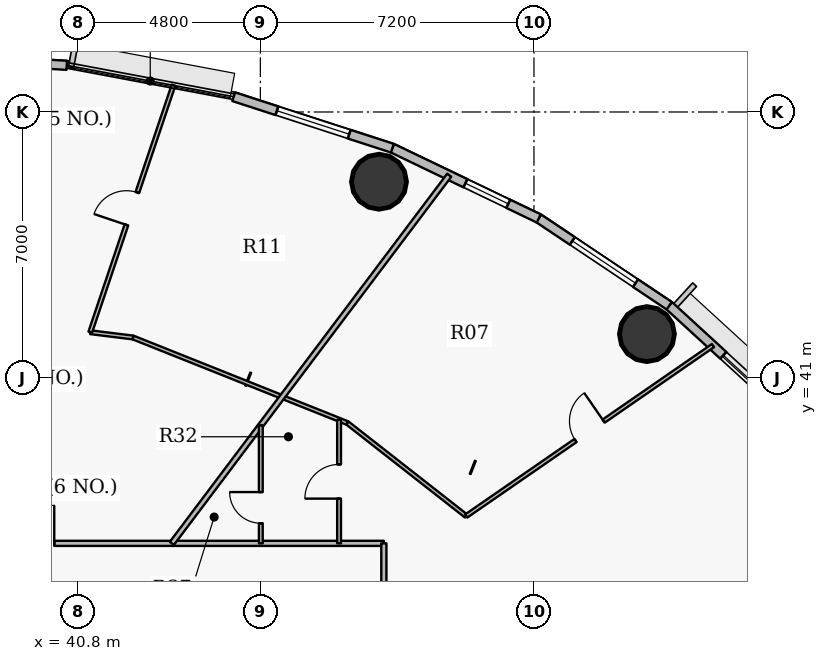
"""IFC4 building model, lengths in metres.
Left out: names, types, materials, properties, quantities, classifications, styles, units other than length and angle.
Written with IfcOpenShell. Run it as: python <this file> out.ifc"""

import sys

from ifc_helpers import new_model, si_unit, direction, frame, frame_2d, origin, origin_2d, place, context, subcontext, project, spatial, rectangle, hollow_circle, extrude, source, transform, mapped, element, fill, save


model = new_model("IFC4")
c1 = context("Model", 3, precision=1e-05, world=origin(), true_north=direction((0.0, 1.0)))
c2 = subcontext(c1, "Body", "Model", "MODEL_VIEW")
j1 = project(units=[si_unit("LENGTHUNIT", "METRE"), si_unit("PLANEANGLEUNIT", "RADIAN")], contexts=[c1])
p1 = place(None, origin())
s1 = spatial("IfcSite", under=j1, at=p1, CompositionType="ELEMENT")
p2 = place(p1, origin())
s2 = spatial("IfcBuilding", under=s1, at=p2, CompositionType="ELEMENT")
p3 = place(p2, frame((0.0, 0.0, 112.2)))
s3 = spatial("IfcBuildingStorey", under=s2, at=p3, CompositionType="ELEMENT", Elevation=112.2)
for number, where, z_axis, x_axis in (
    (1, (55.773, 42.156, 0.0), (0.0, 0.0, 1.0), (1.0, 0.0, 0.0)),
    (2, (48.722, 46.165, 0.0), (0.0, 0.0, 1.0), (1.0, 0.0, 0.0)),
):
    element("IfcColumn", number, at=place(p3, frame(where, z_axis=z_axis, x_axis=x_axis)), inside=s3, PredefinedType="COLUMN", context=c2, shape_type="SweptSolid", body=[
        extrude(hollow_circle(Radius=0.725, WallThickness=0.042, at=origin_2d()), origin(), (0.0, 0.0, 1.0), 3.75),
    ])
p4 = place(p3, frame((56.358, 42.903, 0.0), z_axis=(0.0, 0.0, 1.0), x_axis=(0.737113356241, -0.675769117414, 0.0)))
e3 = element("IfcWall", 3, at=p4, inside=s3, PredefinedType="SOLIDWALL", context=c2, shape_type="SweptSolid", body=[
    extrude(rectangle(XDim=3.976, YDim=0.24, at=frame_2d((1.988, 0.0))), origin(), (0.0, 0.0, 1.0), 3.5),
])
p5 = place(p4, frame((1.933, 0.0, 0.9)))
e4 = element("IfcOpeningElement", 4, at=p5, cuts=e3, PredefinedType="OPENING", context=c2, shape_type="SweptSolid", body=[
    extrude(rectangle(XDim=1.25, YDim=1.65, at=origin_2d()), frame((0.625, 0.13, 0.825), z_axis=(0.0, -1.0, 0.0), x_axis=(1.0, 0.0, 0.0)), (0.0, 0.0, 1.0), 0.26),
])
p6 = place(p3, frame((52.925, 45.199, 0.0), z_axis=(0.0, 0.0, 1.0), x_axis=(0.831221811447, -0.555940914284, 0.0)))
e5 = element("IfcWall", 5, at=p6, inside=s3, PredefinedType="SOLIDWALL", context=c2, shape_type="SweptSolid", body=[
    extrude(rectangle(XDim=4.13, YDim=0.24, at=frame_2d((2.065, 0.0))), origin(), (0.0, 0.0, 1.0), 3.5),
])
p7 = place(p6, frame((1.065, 0.0, 0.9)))
e6 = element("IfcOpeningElement", 6, at=p7, cuts=e5, PredefinedType="OPENING", context=c2, shape_type="SweptSolid", body=[
    extrude(rectangle(XDim=2.0, YDim=1.75, at=origin_2d()), frame((1.0, 0.13, 0.875), z_axis=(0.0, -1.0, 0.0), x_axis=(1.0, 0.0, 0.0)), (0.0, 0.0, 1.0), 0.26),
])
p8 = place(p3, frame((49.074, 47.047, 0.0), z_axis=(0.0, 0.0, 1.0), x_axis=(0.901589935876, -0.432591709962, 0.0)))
e7 = element("IfcWall", 7, at=p8, inside=s3, PredefinedType="SOLIDWALL", context=c2, shape_type="SweptSolid", body=[
    extrude(rectangle(XDim=4.272, YDim=0.24, at=frame_2d((2.136, 0.0))), origin(), (0.0, 0.0, 1.0), 3.5),
])
p9 = place(p8, frame((2.132, 0.0, 0.9)))
e8 = element("IfcOpeningElement", 8, at=p9, cuts=e7, PredefinedType="OPENING", context=c2, shape_type="SweptSolid", body=[
    extrude(rectangle(XDim=1.25, YDim=1.65, at=origin_2d()), frame((0.625, 0.13, 0.825), z_axis=(0.0, -1.0, 0.0), x_axis=(1.0, 0.0, 0.0)), (0.0, 0.0, 1.0), 0.26),
])
p10 = place(p3, frame((44.9, 48.401, 0.0), z_axis=(0.0, 0.0, 1.0), x_axis=(0.951211346073, -0.308540070495, 0.0)))
e9 = element("IfcWall", 9, at=p10, inside=s3, PredefinedType="SOLIDWALL", context=c2, shape_type="SweptSolid", body=[
    extrude(rectangle(XDim=4.388, YDim=0.24, at=frame_2d((2.194, 0.0))), origin(), (0.0, 0.0, 1.0), 3.5),
])
p11 = place(p10, frame((1.194, 0.0, 0.9)))
e10 = element("IfcOpeningElement", 10, at=p11, cuts=e9, PredefinedType="OPENING", context=c2, shape_type="SweptSolid", body=[
    extrude(rectangle(XDim=2.0, YDim=1.75, at=origin_2d()), frame((1.0, 0.13, 0.875), z_axis=(0.0, -1.0, 0.0), x_axis=(1.0, 0.0, 0.0)), (0.0, 0.0, 1.0), 0.26),
])
p12 = place(p3, frame((36.0, 49.505, 0.0), z_axis=(0.0, 0.0, 1.0), x_axis=(0.998107531589, -0.061492726276, 0.0)))
e11 = element("IfcWall", 11, at=p12, inside=s3, PredefinedType="SOLIDWALL", context=c2, shape_type="SweptSolid", body=[
    extrude(rectangle(XDim=4.514, YDim=0.24, at=frame_2d((2.257, 0.0))), origin(), (0.0, 0.0, 1.0), 3.5),
])
p13 = place(p12, frame((1.306, 0.0, 0.9)))
e12 = element("IfcOpeningElement", 12, at=p13, cuts=e11, PredefinedType="OPENING", context=c2, shape_type="SweptSolid", body=[
    extrude(rectangle(XDim=2.0, YDim=1.75, at=origin_2d()), frame((1.0, 0.13, 0.875), z_axis=(0.0, -1.0, 0.0), x_axis=(1.0, 0.0, 0.0)), (0.0, 0.0, 1.0), 0.26),
])
p14 = place(p3, frame((36.042, 36.65, 0.0), z_axis=(0.0, 0.0, 1.0), x_axis=(1.0, 0.0, 0.0)))
e13 = element("IfcWall", 13, at=p14, inside=s3, PredefinedType="PARTITIONING", context=c2, shape_type="SweptSolid", body=[
    extrude(rectangle(XDim=12.808, YDim=0.135, at=frame_2d((6.404, 0.0))), origin(), (0.0, 0.0, 1.0), 2.935),
])
p15 = place(p14, frame((3.135, 0.0, 0.0)))
e14 = element("IfcOpeningElement", 14, at=p15, cuts=e13, PredefinedType="OPENING", context=c2, shape_type="SweptSolid", body=[
    extrude(rectangle(XDim=1.0, YDim=2.15, at=origin_2d()), frame((0.5, 0.078, 1.075), z_axis=(0.0, -1.0, 0.0), x_axis=(1.0, 0.0, 0.0)), (0.0, 0.0, 1.0), 0.155),
])
p16 = place(p3, frame((41.125, 42.205, 0.0), z_axis=(0.0, 0.0, 1.0), x_axis=(0.99240961586, -0.122976234894, 0.0)))
e15 = element("IfcWall", 15, at=p16, inside=s3, PredefinedType="PARTITIONING", context=c2, shape_type="SweptSolid", body=[
    extrude(rectangle(XDim=1.135, YDim=0.1, at=frame_2d((0.568, 0.0))), origin(), (0.0, 0.0, 1.0), 3.5),
])
p17 = place(p3, frame((41.125, 42.205, 0.0), z_axis=(0.0, 0.0, 1.0), x_axis=(0.319387131438, 0.947624324441, 0.0)))
e16 = element("IfcWall", 16, at=p17, inside=s3, PredefinedType="PARTITIONING", context=c2, shape_type="SweptSolid", body=[
    extrude(rectangle(XDim=6.858, YDim=0.1, at=frame_2d((3.429, 0.0))), origin(), (0.0, 0.0, 1.0), 2.935),
])
p18 = place(p17, frame((2.979, 0.0, 0.0)))
e17 = element("IfcOpeningElement", 17, at=p18, cuts=e16, PredefinedType="OPENING", context=c2, shape_type="SweptSolid", body=[
    extrude(rectangle(XDim=0.9, YDim=2.1, at=origin_2d()), frame((0.45, 0.06, 1.05), z_axis=(0.0, -1.0, 0.0), x_axis=(1.0, 0.0, 0.0)), (0.0, 0.0, 1.0), 0.12),
])
p19 = place(p3, frame((42.251, 42.066, 0.0), z_axis=(0.0, 0.0, 1.0), x_axis=(0.9288090756, -0.370558633798, 0.0)))
e18 = element("IfcWall", 18, at=p19, inside=s3, PredefinedType="PARTITIONING", context=c2, shape_type="SweptSolid", body=[
    extrude(rectangle(XDim=6.072, YDim=0.1, at=frame_2d((3.036, 0.0))), origin(), (0.0, 0.0, 1.0), 2.935),
])
p20 = place(p3, frame((43.272, 36.65, 0.0), z_axis=(0.0, 0.0, 1.0), x_axis=(0.601821582461, 0.798630567211, 0.0)))
e19 = element("IfcWall", 19, at=p20, inside=s3, PredefinedType="PARTITIONING", context=c2, shape_type="SweptSolid", body=[
    extrude(rectangle(XDim=12.127, YDim=0.135, at=frame_2d((6.063, 0.0))), origin(), (0.0, 0.0, 1.0), 2.935),
])
p21 = place(p3, frame((45.612, 36.65, 0.0), z_axis=(0.0, 0.0, 1.0), x_axis=(0.0, 1.0, 0.0)))
e20 = element("IfcWall", 20, at=p21, inside=s3, PredefinedType="PARTITIONING", context=c2, shape_type="SweptSolid", body=[
    extrude(rectangle(XDim=3.106, YDim=0.1, at=frame_2d((1.553, 0.0))), origin(), (0.0, 0.0, 1.0), 3.5),
])
p22 = place(p21, frame((0.529, 0.0, 0.0)))
e21 = element("IfcOpeningElement", 21, at=p22, cuts=e20, PredefinedType="OPENING", context=c2, shape_type="SweptSolid", body=[
    extrude(rectangle(XDim=0.82, YDim=2.1, at=origin_2d()), frame((0.41, 0.06, 1.05), z_axis=(0.0, -1.0, 0.0), x_axis=(1.0, 0.0, 0.0)), (0.0, 0.0, 1.0), 0.12),
])
p23 = place(p3, frame((47.672, 36.65, 0.0), z_axis=(0.0, 0.0, 1.0), x_axis=(0.0, 1.0, 0.0)))
e22 = element("IfcWall", 22, at=p23, inside=s3, PredefinedType="PARTITIONING", context=c2, shape_type="SweptSolid", body=[
    extrude(rectangle(XDim=3.253, YDim=0.1, at=frame_2d((1.626, 0.0))), origin(), (0.0, 0.0, 1.0), 2.985),
])
p24 = place(p23, frame((1.177, 0.0, 0.0)))
e23 = element("IfcOpeningElement", 23, at=p24, cuts=e22, PredefinedType="OPENING", context=c2, shape_type="SweptSolid", body=[
    extrude(rectangle(XDim=0.9, YDim=2.1, at=origin_2d()), frame((0.45, 0.06, 1.05), z_axis=(0.0, -1.0, 0.0), x_axis=(1.0, 0.0, 0.0)), (0.0, 0.0, 1.0), 0.12),
])
p25 = place(p3, frame((47.891, 39.816, 0.0), z_axis=(0.0, 0.0, 1.0), x_axis=(0.787331052764, -0.616530464254, 0.0)))
e24 = element("IfcWall", 24, at=p25, inside=s3, PredefinedType="PARTITIONING", context=c2, shape_type="SweptSolid", body=[
    extrude(rectangle(XDim=3.969, YDim=0.1, at=frame_2d((1.985, 0.0))), origin(), (0.0, 0.0, 1.0), 2.935),
])
p26 = place(p3, frame((48.85, 17.35, 0.0), z_axis=(0.0, 0.0, 1.0), x_axis=(0.0, 1.0, 0.0)))
e25 = element("IfcWall", 25, at=p26, inside=s3, PredefinedType="PARTITIONING", context=c2, shape_type="SweptSolid", body=[
    extrude(rectangle(XDim=19.3, YDim=0.135, at=frame_2d((9.65, 0.0))), origin(), (0.0, 0.0, 1.0), 2.935),
])
p27 = place(p26, frame((4.107, 0.0, 0.0)))
e26 = element("IfcOpeningElement", 26, at=p27, cuts=e25, PredefinedType="OPENING", context=c2, shape_type="SweptSolid", body=[
    extrude(rectangle(XDim=1.0, YDim=2.15, at=origin_2d()), frame((0.5, 0.078, 1.075), z_axis=(0.0, -1.0, 0.0), x_axis=(1.0, 0.0, 0.0)), (0.0, 0.0, 1.0), 0.155),
])
p28 = place(p26, frame((13.717, 0.0, 0.0)))
e27 = element("IfcOpeningElement", 27, at=p28, cuts=e25, PredefinedType="OPENING", context=c2, shape_type="SweptSolid", body=[
    extrude(rectangle(XDim=1.0, YDim=2.15, at=origin_2d()), frame((0.5, 0.078, 1.075), z_axis=(0.0, -1.0, 0.0), x_axis=(1.0, 0.0, 0.0)), (0.0, 0.0, 1.0), 0.155),
])
p29 = place(p3, frame((51.016, 37.368, 0.0), z_axis=(0.0, 0.0, 1.0), x_axis=(0.822878649823, 0.568217148338, 0.0)))
e28 = element("IfcWall", 28, at=p29, inside=s3, PredefinedType="PARTITIONING", context=c2, shape_type="SweptSolid", body=[
    extrude(rectangle(XDim=7.893, YDim=0.1, at=frame_2d((3.946, 0.0))), origin(), (0.0, 0.0, 1.0), 2.935),
])
p30 = place(p29, frame((3.497, 0.0, 0.0)))
e29 = element("IfcOpeningElement", 29, at=p30, cuts=e28, PredefinedType="OPENING", context=c2, shape_type="SweptSolid", body=[
    extrude(rectangle(XDim=0.9, YDim=2.1, at=origin_2d()), frame((0.45, 0.06, 1.05), z_axis=(0.0, -1.0, 0.0), x_axis=(1.0, 0.0, 0.0)), (0.0, 0.0, 1.0), 0.12),
])
m1 = source(origin(), c2, "Body", "SweptSolid", [
    extrude(rectangle(XDim=1.25, YDim=1.65, at=origin_2d()), frame((0.625, 0.03, 0.825), z_axis=(0.0, -1.0, 0.0), x_axis=(1.0, 0.0, 0.0)), (0.0, 0.0, 1.0), 0.06),
])
p31 = place(p5, origin())
e30 = element("IfcWindow", 30, at=p31, inside=s3, PartitioningType="SINGLE_PANEL", PredefinedType="WINDOW", context=c2, shape_type="MappedRepresentation", body=[
    mapped(m1, transform((0.0, 0.0, 0.0), x_axis=(1.0, 0.0, 0.0), y_axis=(0.0, 1.0, 0.0), z_axis=(0.0, 0.0, 1.0), scale=1.0)),
])
fill(e4, e30)
m2 = source(origin(), c2, "Body", "SweptSolid", [
    extrude(rectangle(XDim=2.0, YDim=1.75, at=origin_2d()), frame((1.0, 0.03, 0.875), z_axis=(0.0, -1.0, 0.0), x_axis=(1.0, 0.0, 0.0)), (0.0, 0.0, 1.0), 0.06),
])
p32 = place(p7, origin())
e31 = element("IfcWindow", 31, at=p32, inside=s3, PartitioningType="DOUBLE_PANEL_VERTICAL", PredefinedType="WINDOW", context=c2, shape_type="MappedRepresentation", body=[
    mapped(m2, transform((0.0, 0.0, 0.0), x_axis=(1.0, 0.0, 0.0), y_axis=(0.0, 1.0, 0.0), z_axis=(0.0, 0.0, 1.0), scale=1.0)),
])
fill(e6, e31)
p33 = place(p9, origin())
e32 = element("IfcWindow", 32, at=p33, inside=s3, PartitioningType="SINGLE_PANEL", PredefinedType="WINDOW", context=c2, shape_type="MappedRepresentation", body=[
    mapped(m1, transform((0.0, 0.0, 0.0), x_axis=(1.0, 0.0, 0.0), y_axis=(0.0, 1.0, 0.0), z_axis=(0.0, 0.0, 1.0), scale=1.0)),
])
fill(e8, e32)
p34 = place(p11, origin())
e33 = element("IfcWindow", 33, at=p34, inside=s3, PartitioningType="DOUBLE_PANEL_VERTICAL", PredefinedType="WINDOW", context=c2, shape_type="MappedRepresentation", body=[
    mapped(m2, transform((0.0, 0.0, 0.0), x_axis=(1.0, 0.0, 0.0), y_axis=(0.0, 1.0, 0.0), z_axis=(0.0, 0.0, 1.0), scale=1.0)),
])
fill(e10, e33)
m3 = source(origin(), c2, "Body", "SweptSolid", [
    extrude(rectangle(XDim=1.0, YDim=2.15, at=origin_2d()), frame((0.5, 0.025, 1.075), z_axis=(0.0, -1.0, 0.0), x_axis=(1.0, 0.0, 0.0)), (0.0, 0.0, 1.0), 0.05),
])
p35 = place(p15, origin())
e34 = element("IfcDoor", 34, at=p35, inside=s3, OperationType="SINGLE_SWING_RIGHT", PredefinedType="DOOR", context=c2, shape_type="MappedRepresentation", body=[
    mapped(m3, transform((0.0, 0.0, 0.0), x_axis=(1.0, 0.0, 0.0), y_axis=(0.0, 1.0, 0.0), z_axis=(0.0, 0.0, 1.0), scale=1.0)),
])
fill(e14, e34)
m4 = source(origin(), c2, "Body", "SweptSolid", [
    extrude(rectangle(XDim=0.9, YDim=2.1, at=origin_2d()), frame((0.45, 0.025, 1.05), z_axis=(0.0, -1.0, 0.0), x_axis=(1.0, 0.0, 0.0)), (0.0, 0.0, 1.0), 0.05),
])
p36 = place(p18, origin())
e35 = element("IfcDoor", 35, at=p36, inside=s3, OperationType="SINGLE_SWING_LEFT", PredefinedType="DOOR", context=c2, shape_type="MappedRepresentation", body=[
    mapped(m4, transform((0.0, 0.0, 0.0), x_axis=(1.0, 0.0, 0.0), y_axis=(0.0, 1.0, 0.0), z_axis=(0.0, 0.0, 1.0), scale=1.0)),
])
fill(e17, e35)
p37 = place(p30, origin())
e36 = element("IfcDoor", 36, at=p37, inside=s3, OperationType="SINGLE_SWING_RIGHT", PredefinedType="DOOR", context=c2, shape_type="MappedRepresentation", body=[
    mapped(m4, transform((0.0, 0.0, 0.0), x_axis=(1.0, 0.0, 0.0), y_axis=(0.0, 1.0, 0.0), z_axis=(0.0, 0.0, 1.0), scale=1.0)),
])
fill(e29, e36)
p38 = place(p24, origin())
e37 = element("IfcDoor", 37, at=p38, inside=s3, OperationType="SINGLE_SWING_LEFT", PredefinedType="DOOR", context=c2, shape_type="MappedRepresentation", body=[
    mapped(m4, transform((0.0, 0.0, 0.0), x_axis=(1.0, 0.0, 0.0), y_axis=(0.0, 1.0, 0.0), z_axis=(0.0, 0.0, 1.0), scale=1.0)),
])
fill(e23, e37)
m5 = source(origin(), c2, "Body", "SweptSolid", [
    extrude(rectangle(XDim=0.82, YDim=2.1, at=origin_2d()), frame((0.41, 0.025, 1.05), z_axis=(0.0, -1.0, 0.0), x_axis=(1.0, 0.0, 0.0)), (0.0, 0.0, 1.0), 0.05),
])
p39 = place(p22, origin())
e38 = element("IfcDoor", 38, at=p39, inside=s3, OperationType="SINGLE_SWING_RIGHT", PredefinedType="DOOR", context=c2, shape_type="MappedRepresentation", body=[
    mapped(m5, transform((0.0, 0.0, 0.0), x_axis=(1.0, 0.0, 0.0), y_axis=(0.0, 1.0, 0.0), z_axis=(0.0, 0.0, 1.0), scale=1.0)),
])
fill(e21, e38)
save(model, sys.argv[1])
